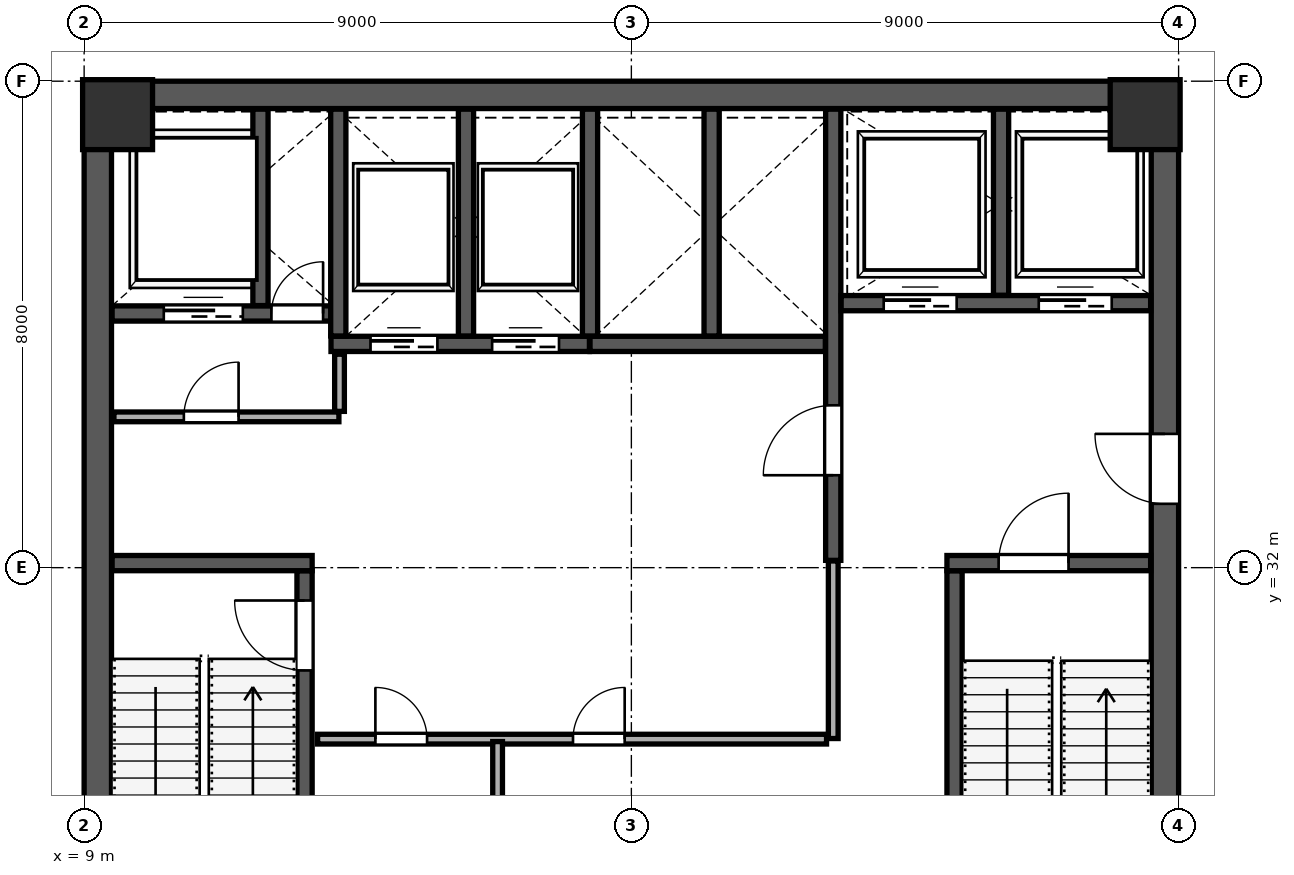
"""IFC4 building model, lengths in metres.
Left out: names, types, materials, properties, quantities, classifications, styles, units other than length and angle.
Written with IfcOpenShell. Run it as: python <this file> out.ifc"""

import sys

from ifc_helpers import new_model, si_unit, direction, frame, frame_2d, origin, origin_2d, place, context, subcontext, project, spatial, rectangle, extrude, source, transform, mapped, element, fill, save


model = new_model("IFC4")
c1 = context("Model", 3, precision=1e-05, world=origin(), true_north=direction((0.0, 1.0)))
c2 = subcontext(c1, "Body", "Model", "MODEL_VIEW")
j1 = project(units=[si_unit("LENGTHUNIT", "METRE"), si_unit("PLANEANGLEUNIT", "RADIAN")], contexts=[c1])
p1 = place(None, origin())
s1 = spatial("IfcSite", under=j1, at=p1, CompositionType="ELEMENT")
p2 = place(p1, origin())
s2 = spatial("IfcBuilding", under=s1, at=p2, CompositionType="ELEMENT")
p3 = place(p2, frame((0.0, 0.0, 179.2)))
s3 = spatial("IfcBuildingStorey", under=s2, at=p3, CompositionType="ELEMENT", Elevation=179.2)
m1 = source(origin(), c2, "Body", "SweptSolid", [
    extrude(rectangle(XDim=1.15, YDim=1.15, at=origin_2d()), origin(), (0.0, 0.0, 1.0), 4.198),
])
for number, where, z_axis, x_axis in (
    (1, (9.55, 39.45, 0.001), (0.0, 0.0, 1.0), (1.0, 0.0, 0.0)),
    (2, (26.45, 39.45, 0.001), (0.0, 0.0, 1.0), (1.0, 0.0, 0.0)),
):
    element("IfcColumn", number, at=place(p3, frame(where, z_axis=z_axis, x_axis=x_axis)), inside=s3, PredefinedType="COLUMN", context=c2, shape_type="MappedRepresentation", body=[
        mapped(m1, transform((0.0, 0.0, 0.0), scale=1.0)),
    ])
p4 = place(p3, frame((9.225, 24.45, 0.0), z_axis=(0.0, 0.0, 1.0), x_axis=(0.0, 1.0, 0.0)))
e3 = element("IfcWall", 3, at=p4, inside=s3, PredefinedType="SHEAR", context=c2, shape_type="SweptSolid", body=[
    extrude(rectangle(XDim=15.1, YDim=0.45, at=frame_2d((7.55, 0.0))), origin(), (0.0, 0.0, 1.0), 3.96),
])
p5 = place(p3, frame((26.775, 24.45, 0.0), z_axis=(0.0, 0.0, 1.0), x_axis=(0.0, 1.0, 0.0)))
e4 = element("IfcWall", 4, at=p5, inside=s3, PredefinedType="SHEAR", context=c2, shape_type="SweptSolid", body=[
    extrude(rectangle(XDim=15.1, YDim=0.45, at=frame_2d((7.55, 0.0))), origin(), (0.0, 0.0, 1.0), 3.96),
])
p6 = place(p5, frame((8.6, 0.0, 0.0)))
e5 = element("IfcOpeningElement", 5, at=p6, cuts=e4, PredefinedType="OPENING", context=c2, shape_type="SweptSolid", body=[
    extrude(rectangle(XDim=1.15, YDim=2.2, at=frame_2d((0.575, 1.1))), frame((0.0, 0.235, 0.0), z_axis=(0.0, -1.0, 0.0), x_axis=(1.0, 0.0, 0.0)), (0.0, 0.0, 1.0), 0.47),
])
p7 = place(p3, frame((9.0, 39.775, 0.0), z_axis=(0.0, 0.0, 1.0), x_axis=(1.0, 0.0, 0.0)))
e6 = element("IfcWall", 6, at=p7, inside=s3, PredefinedType="SHEAR", context=c2, shape_type="SweptSolid", body=[
    extrude(rectangle(XDim=18.0, YDim=0.45, at=frame_2d((9.0, 0.0))), origin(), (0.0, 0.0, 1.0), 3.96),
])
p8 = place(p3, frame((12.625, 24.46, 0.0), z_axis=(0.0, 0.0, 1.0), x_axis=(0.0, 1.0, 0.0)))
e7 = element("IfcWall", 7, at=p8, inside=s3, PredefinedType="SHEAR", context=c2, shape_type="SweptSolid", body=[
    extrude(rectangle(XDim=7.49, YDim=0.25, at=frame_2d((3.745, 0.0))), origin(), (0.0, 0.0, 1.0), 3.96),
])
p9 = place(p8, frame((5.85, 0.0, 0.0)))
e8 = element("IfcOpeningElement", 8, at=p9, cuts=e7, PredefinedType="OPENING", context=c2, shape_type="SweptSolid", body=[
    extrude(rectangle(XDim=1.15, YDim=2.2, at=frame_2d((0.575, 1.1))), frame((0.0, 0.135, 0.0), z_axis=(0.0, -1.0, 0.0), x_axis=(1.0, 0.0, 0.0)), (0.0, 0.0, 1.0), 0.27),
])
p10 = place(p3, frame((9.46, 32.075, 0.0), z_axis=(0.0, 0.0, 1.0), x_axis=(1.0, 0.0, 0.0)))
e9 = element("IfcWall", 9, at=p10, inside=s3, PredefinedType="SHEAR", context=c2, shape_type="SweptSolid", body=[
    extrude(rectangle(XDim=3.29, YDim=0.25, at=frame_2d((1.645, 0.0))), origin(), (0.0, 0.0, 1.0), 3.96),
])
p11 = place(p3, frame((23.315, 24.46, 0.0), z_axis=(0.0, 0.0, 1.0), x_axis=(0.0, 1.0, 0.0)))
e10 = element("IfcWall", 10, at=p11, inside=s3, PredefinedType="SHEAR", context=c2, shape_type="SweptSolid", body=[
    extrude(rectangle(XDim=7.49, YDim=0.25, at=frame_2d((3.745, 0.0))), origin(), (0.0, 0.0, 1.0), 3.96),
])
p12 = place(p3, frame((23.19, 32.075, 0.0), z_axis=(0.0, 0.0, 1.0), x_axis=(1.0, 0.0, 0.0)))
e11 = element("IfcWall", 11, at=p12, inside=s3, PredefinedType="SHEAR", context=c2, shape_type="SweptSolid", body=[
    extrude(rectangle(XDim=3.35, YDim=0.25, at=frame_2d((1.675, 0.0))), origin(), (0.0, 0.0, 1.0), 3.96),
])
p13 = place(p12, frame((0.85, 0.0, 0.0)))
e12 = element("IfcOpeningElement", 12, at=p13, cuts=e11, PredefinedType="OPENING", context=c2, shape_type="SweptSolid", body=[
    extrude(rectangle(XDim=1.15, YDim=2.2, at=frame_2d((0.575, 1.1))), frame((0.0, 0.135, 0.0), z_axis=(0.0, -1.0, 0.0), x_axis=(1.0, 0.0, 0.0)), (0.0, 0.0, 1.0), 0.27),
])
p14 = place(p3, frame((21.32, 32.12, 0.0), z_axis=(0.0, 0.0, 1.0), x_axis=(0.0, 1.0, 0.0)))
e13 = element("IfcWall", 13, at=p14, inside=s3, PredefinedType="SHEAR", context=c2, shape_type="SweptSolid", body=[
    extrude(rectangle(XDim=7.42, YDim=0.25, at=frame_2d((3.71, 0.0))), origin(), (0.0, 0.0, 1.0), 3.96),
])
p15 = place(p14, frame((1.4, 0.0, 0.0)))
e14 = element("IfcOpeningElement", 14, at=p15, cuts=e13, PredefinedType="OPENING", context=c2, shape_type="SweptSolid", body=[
    extrude(rectangle(XDim=1.15, YDim=2.2, at=frame_2d((0.575, 1.1))), frame((0.0, 0.135, 0.0), z_axis=(0.0, -1.0, 0.0), x_axis=(1.0, 0.0, 0.0)), (0.0, 0.0, 1.0), 0.27),
])
p16 = place(p3, frame((9.46, 36.18, 0.0), z_axis=(0.0, 0.0, 1.0), x_axis=(1.0, 0.0, 0.0)))
e15 = element("IfcWall", 15, at=p16, inside=s3, PredefinedType="SHEAR", context=c2, shape_type="SweptSolid", body=[
    extrude(rectangle(XDim=3.79, YDim=0.25, at=frame_2d((1.895, 0.0))), origin(), (0.0, 0.0, 1.0), 3.96),
])
p17 = place(p16, frame((2.62, 0.0, 0.0)))
e16 = element("IfcOpeningElement", 16, at=p17, cuts=e15, PredefinedType="OPENING", context=c2, shape_type="SweptSolid", body=[
    extrude(rectangle(XDim=0.85, YDim=2.1, at=frame_2d((0.425, 1.05))), frame((0.0, 0.135, 0.0), z_axis=(0.0, -1.0, 0.0), x_axis=(1.0, 0.0, 0.0)), (0.0, 0.0, 1.0), 0.27),
])
p18 = place(p16, frame((0.85, 0.0, 0.0)))
e17 = element("IfcOpeningElement", 17, at=p18, cuts=e15, PredefinedType="OPENING", context=c2, shape_type="SweptSolid", body=[
    extrude(rectangle(XDim=1.3, YDim=2.25, at=frame_2d((0.65, 1.125))), frame((0.0, 0.135, 0.0), z_axis=(0.0, -1.0, 0.0), x_axis=(1.0, 0.0, 0.0)), (0.0, 0.0, 1.0), 0.27),
])
p19 = place(p3, frame((11.9, 36.31, 0.0), z_axis=(0.0, 0.0, 1.0), x_axis=(0.0, 1.0, 0.0)))
e18 = element("IfcWall", 18, at=p19, inside=s3, PredefinedType="SHEAR", context=c2, shape_type="SweptSolid", body=[
    extrude(rectangle(XDim=3.23, YDim=0.25, at=frame_2d((1.615, 0.0))), origin(), (0.0, 0.0, 1.0), 3.96),
])
p20 = place(p3, frame((21.45, 36.35, 0.0), z_axis=(0.0, 0.0, 1.0), x_axis=(1.0, 0.0, 0.0)))
e19 = element("IfcWall", 19, at=p20, inside=s3, PredefinedType="SHEAR", context=c2, shape_type="SweptSolid", body=[
    extrude(rectangle(XDim=5.09, YDim=0.25, at=frame_2d((2.545, 0.0))), origin(), (0.0, 0.0, 1.0), 3.96),
])
p21 = place(p20, frame((0.7, 0.0, 0.0)))
e20 = element("IfcOpeningElement", 20, at=p21, cuts=e19, PredefinedType="OPENING", context=c2, shape_type="SweptSolid", body=[
    extrude(rectangle(XDim=1.2, YDim=2.2, at=frame_2d((0.6, 1.1))), frame((0.0, 0.135, 0.0), z_axis=(0.0, -1.0, 0.0), x_axis=(1.0, 0.0, 0.0)), (0.0, 0.0, 1.0), 0.27),
])
p22 = place(p20, frame((3.25, 0.0, 0.0)))
e21 = element("IfcOpeningElement", 21, at=p22, cuts=e19, PredefinedType="OPENING", context=c2, shape_type="SweptSolid", body=[
    extrude(rectangle(XDim=1.2, YDim=2.2, at=frame_2d((0.6, 1.1))), frame((0.0, 0.135, 0.0), z_axis=(0.0, -1.0, 0.0), x_axis=(1.0, 0.0, 0.0)), (0.0, 0.0, 1.0), 0.27),
])
p23 = place(p3, frame((24.08, 36.48, 0.0), z_axis=(0.0, 0.0, 1.0), x_axis=(0.0, 1.0, 0.0)))
e22 = element("IfcWall", 22, at=p23, inside=s3, PredefinedType="SHEAR", context=c2, shape_type="SweptSolid", body=[
    extrude(rectangle(XDim=3.06, YDim=0.25, at=frame_2d((1.53, 0.0))), origin(), (0.0, 0.0, 1.0), 3.96),
])
p24 = place(p3, frame((13.06, 35.68, 0.0), z_axis=(0.0, 0.0, 1.0), x_axis=(1.0, 0.0, 0.0)))
e23 = element("IfcWall", 23, at=p24, inside=s3, PredefinedType="SHEAR", context=c2, shape_type="SweptSolid", body=[
    extrude(rectangle(XDim=4.25, YDim=0.25, at=frame_2d((2.125, 0.0))), origin(), (0.0, 0.0, 1.0), 3.96),
])
p25 = place(p24, frame((0.65, 0.0, 0.0)))
e24 = element("IfcOpeningElement", 24, at=p25, cuts=e23, PredefinedType="OPENING", context=c2, shape_type="SweptSolid", body=[
    extrude(rectangle(XDim=1.1, YDim=2.2, at=frame_2d((0.55, 1.1))), frame((0.0, 0.135, 0.0), z_axis=(0.0, -1.0, 0.0), x_axis=(1.0, 0.0, 0.0)), (0.0, 0.0, 1.0), 0.27),
])
p26 = place(p24, frame((2.65, 0.0, 0.0)))
e25 = element("IfcOpeningElement", 25, at=p26, cuts=e23, PredefinedType="OPENING", context=c2, shape_type="SweptSolid", body=[
    extrude(rectangle(XDim=1.1, YDim=2.2, at=frame_2d((0.55, 1.1))), frame((0.0, 0.135, 0.0), z_axis=(0.0, -1.0, 0.0), x_axis=(1.0, 0.0, 0.0)), (0.0, 0.0, 1.0), 0.27),
])
for number, where, z_axis, x_axis in (
    (26, (13.18, 35.81, 0.0), (0.0, 0.0, 1.0), (0.0, 1.0, 0.0)),
    (27, (15.28, 35.81, 0.0), (0.0, 0.0, 1.0), (0.0, 1.0, 0.0)),
):
    element("IfcWall", number, at=place(p3, frame(where, z_axis=z_axis, x_axis=x_axis)), inside=s3, PredefinedType="SHEAR", context=c2, shape_type="SweptSolid", body=[
        extrude(rectangle(XDim=3.73, YDim=0.25, at=frame_2d((1.865, 0.0))), origin(), (0.0, 0.0, 1.0), 3.96),
    ])
p27 = place(p3, frame((17.32, 35.68, 0.0), z_axis=(0.0, 0.0, 1.0), x_axis=(1.0, 0.0, 0.0)))
e28 = element("IfcWall", 28, at=p27, inside=s3, PredefinedType="SHEAR", context=c2, shape_type="SweptSolid", body=[
    extrude(rectangle(XDim=3.87, YDim=0.25, at=frame_2d((1.935, 0.0))), origin(), (0.0, 0.0, 1.0), 3.96),
])
for number, where, z_axis, x_axis in (
    (29, (17.32, 35.81, 0.0), (0.0, 0.0, 1.0), (0.0, 1.0, 0.0)),
    (30, (19.32, 35.81, 0.0), (0.0, 0.0, 1.0), (0.0, 1.0, 0.0)),
):
    element("IfcWall", number, at=place(p3, frame(where, z_axis=z_axis, x_axis=x_axis)), inside=s3, PredefinedType="SHEAR", context=c2, shape_type="SweptSolid", body=[
        extrude(rectangle(XDim=3.73, YDim=0.25, at=frame_2d((1.865, 0.0))), origin(), (0.0, 0.0, 1.0), 3.96),
    ])
p28 = place(p3, frame((9.49, 34.48, 0.0), z_axis=(0.0, 0.0, 1.0), x_axis=(1.0, 0.0, 0.0)))
e31 = element("IfcWall", 31, at=p28, inside=s3, PredefinedType="PARTITIONING", context=c2, shape_type="SweptSolid", body=[
    extrude(rectangle(XDim=3.7, YDim=0.16, at=frame_2d((1.85, 0.0))), origin(), (0.0, 0.0, 1.0), 3.96),
])
p29 = place(p28, frame((1.15, 0.0, 0.0)))
e32 = element("IfcOpeningElement", 32, at=p29, cuts=e31, PredefinedType="OPENING", context=c2, shape_type="SweptSolid", body=[
    extrude(rectangle(XDim=0.9, YDim=2.15, at=frame_2d((0.45, 1.075))), frame((0.0, 0.09, 0.0), z_axis=(0.0, -1.0, 0.0), x_axis=(1.0, 0.0, 0.0)), (0.0, 0.0, 1.0), 0.18),
])
p30 = place(p3, frame((13.2, 34.57, 0.0), z_axis=(0.0, 0.0, 1.0), x_axis=(0.0, 1.0, 0.0)))
e33 = element("IfcWall", 33, at=p30, inside=s3, PredefinedType="PARTITIONING", context=c2, shape_type="SweptSolid", body=[
    extrude(rectangle(XDim=0.94, YDim=0.16, at=frame_2d((0.47, 0.0))), origin(), (0.0, 0.0, 1.0), 3.96),
])
p31 = place(p3, frame((12.84, 29.18, 0.0), z_axis=(0.0, 0.0, 1.0), x_axis=(1.0, 0.0, 0.0)))
e34 = element("IfcWall", 34, at=p31, inside=s3, PredefinedType="PARTITIONING", context=c2, shape_type="SweptSolid", body=[
    extrude(rectangle(XDim=8.37, YDim=0.16, at=frame_2d((4.185, 0.0))), origin(), (0.0, 0.0, 1.0), 3.96),
])
p32 = place(p31, frame((0.95, 0.0, 0.0)))
e35 = element("IfcOpeningElement", 35, at=p32, cuts=e34, PredefinedType="OPENING", context=c2, shape_type="SweptSolid", body=[
    extrude(rectangle(XDim=0.85, YDim=2.1, at=frame_2d((0.425, 1.05))), frame((0.0, 0.09, 0.0), z_axis=(0.0, -1.0, 0.0), x_axis=(1.0, 0.0, 0.0)), (0.0, 0.0, 1.0), 0.18),
])
p33 = place(p31, frame((4.2, 0.0, 0.0)))
e36 = element("IfcOpeningElement", 36, at=p33, cuts=e34, PredefinedType="OPENING", context=c2, shape_type="SweptSolid", body=[
    extrude(rectangle(XDim=0.85, YDim=2.1, at=frame_2d((0.425, 1.05))), frame((0.0, 0.09, 0.0), z_axis=(0.0, -1.0, 0.0), x_axis=(1.0, 0.0, 0.0)), (0.0, 0.0, 1.0), 0.18),
])
p34 = place(p3, frame((15.8, 24.54, 0.0), z_axis=(0.0, 0.0, 1.0), x_axis=(0.0, 1.0, 0.0)))
e37 = element("IfcWall", 37, at=p34, inside=s3, PredefinedType="PARTITIONING", context=c2, shape_type="SweptSolid", body=[
    extrude(rectangle(XDim=4.6, YDim=0.16, at=frame_2d((2.3, 0.0))), origin(), (0.0, 0.0, 1.0), 3.96),
])
p35 = place(p3, frame((21.32, 29.19, 0.0), z_axis=(0.0, 0.0, 1.0), x_axis=(0.0, 1.0, 0.0)))
e38 = element("IfcWall", 38, at=p35, inside=s3, PredefinedType="PARTITIONING", context=c2, shape_type="SweptSolid", body=[
    extrude(rectangle(XDim=2.92, YDim=0.16, at=frame_2d((1.46, 0.0))), origin(), (0.0, 0.0, 1.0), 3.96),
])
p36 = place(p3, frame((13.23, 49.696, 0.0), z_axis=(0.0, 0.0, 1.0), x_axis=(0.866026251752, -0.499998531275, 0.0)))
e39 = element("IfcWall", 39, at=p36, inside=s3, PredefinedType="PARTITIONING", context=c2, shape_type="SweptSolid", body=[
    extrude(rectangle(XDim=26.69, YDim=0.115, at=frame_2d((13.345, 0.0))), origin(), (0.0, 0.0, 1.0), 3.96),
])
p37 = place(p36, frame((2.1, 0.0, 0.0)))
e40 = element("IfcOpeningElement", 40, at=p37, cuts=e39, PredefinedType="OPENING", context=c2, shape_type="SweptSolid", body=[
    extrude(rectangle(XDim=0.95, YDim=2.15, at=frame_2d((0.475, 1.075))), frame((0.0, 0.067, 0.0), z_axis=(0.0, -1.0, 0.0), x_axis=(1.0, 0.0, 0.0)), (0.0, 0.0, 1.0), 0.135),
])
p38 = place(p36, frame((18.2, 0.0, 0.0)))
e41 = element("IfcOpeningElement", 41, at=p38, cuts=e39, PredefinedType="OPENING", context=c2, shape_type="SweptSolid", body=[
    extrude(rectangle(XDim=0.95, YDim=2.15, at=frame_2d((0.475, 1.075))), frame((0.0, 0.067, 0.0), z_axis=(0.0, -1.0, 0.0), x_axis=(1.0, 0.0, 0.0)), (0.0, 0.0, 1.0), 0.135),
])
p39 = place(p3, frame((1.625, 29.676, 0.0), z_axis=(0.0, 0.0, 1.0), x_axis=(0.500002707681, 0.866023840498, 0.0)))
e42 = element("IfcWall", 42, at=p39, inside=s3, PredefinedType="PARTITIONING", context=c2, shape_type="SweptSolid", body=[
    extrude(rectangle(XDim=23.1, YDim=0.115, at=frame_2d((11.55, 0.0))), origin(), (0.0, 0.0, 1.0), 3.96),
])
p40 = place(p39, frame((1.3, 0.0, 0.0)))
e43 = element("IfcOpeningElement", 43, at=p40, cuts=e42, PredefinedType="OPENING", context=c2, shape_type="SweptSolid", body=[
    extrude(rectangle(XDim=0.95, YDim=2.15, at=frame_2d((0.475, 1.075))), frame((0.0, 0.067, 0.0), z_axis=(0.0, -1.0, 0.0), x_axis=(1.0, 0.0, 0.0)), (0.0, 0.0, 1.0), 0.135),
])
p41 = place(p39, frame((13.8, 0.0, 0.0)))
e44 = element("IfcOpeningElement", 44, at=p41, cuts=e42, PredefinedType="OPENING", context=c2, shape_type="SweptSolid", body=[
    extrude(rectangle(XDim=0.95, YDim=2.15, at=frame_2d((0.475, 1.075))), frame((0.0, 0.067, 0.0), z_axis=(0.0, -1.0, 0.0), x_axis=(1.0, 0.0, 0.0)), (0.0, 0.0, 1.0), 0.135),
])
p42 = place(p3, frame((21.774, 11.034, 0.0), z_axis=(0.0, 0.0, 1.0), x_axis=(0.500008037328, 0.866020763381, 0.0)))
e45 = element("IfcWall", 45, at=p42, inside=s3, PredefinedType="PARTITIONING", context=c2, shape_type="SweptSolid", body=[
    extrude(rectangle(XDim=19.98, YDim=0.16, at=frame_2d((9.99, 0.0))), origin(), (0.0, 0.0, 1.0), 3.96),
])
m2 = source(origin(), c2, "Body", "SweptSolid", [
    extrude(rectangle(XDim=1.15, YDim=2.2, at=frame_2d((0.575, 1.1))), frame((0.0, 0.025, 0.0), z_axis=(0.0, -1.0, 0.0), x_axis=(1.0, 0.0, 0.0)), (0.0, 0.0, 1.0), 0.05),
])
p43 = place(p9, origin())
e46 = element("IfcDoor", 46, at=p43, inside=s3, OperationType="SINGLE_SWING_RIGHT", PredefinedType="DOOR", context=c2, shape_type="MappedRepresentation", body=[
    mapped(m2, transform((0.0, 0.0, 0.0), scale=1.0)),
])
fill(e8, e46)
m3 = source(origin(), c2, "Body", "SweptSolid", [
    extrude(rectangle(XDim=1.15, YDim=2.2, at=frame_2d((0.575, 1.1))), frame((0.0, 0.025, 0.0), z_axis=(0.0, -1.0, 0.0), x_axis=(1.0, 0.0, 0.0)), (0.0, 0.0, 1.0), 0.05),
])
p44 = place(p15, origin())
e47 = element("IfcDoor", 47, at=p44, inside=s3, OperationType="SINGLE_SWING_LEFT", PredefinedType="DOOR", context=c2, shape_type="MappedRepresentation", body=[
    mapped(m3, transform((0.0, 0.0, 0.0), scale=1.0)),
])
fill(e14, e47)
p45 = place(p13, origin())
e48 = element("IfcDoor", 48, at=p45, inside=s3, OperationType="SINGLE_SWING_RIGHT", PredefinedType="DOOR", context=c2, shape_type="MappedRepresentation", body=[
    mapped(m2, transform((0.0, 0.0, 0.0), scale=1.0)),
])
fill(e12, e48)
p46 = place(p6, origin())
e49 = element("IfcDoor", 49, at=p46, inside=s3, OperationType="SINGLE_SWING_RIGHT", PredefinedType="DOOR", context=c2, shape_type="MappedRepresentation", body=[
    mapped(m3, transform((0.0, 0.0, 0.0), scale=1.0)),
])
fill(e5, e49)
m4 = source(origin(), c2, "Body", "SweptSolid", [
    extrude(rectangle(XDim=0.85, YDim=2.1, at=frame_2d((0.425, 1.05))), frame((0.0, 0.025, 0.0), z_axis=(0.0, -1.0, 0.0), x_axis=(1.0, 0.0, 0.0)), (0.0, 0.0, 1.0), 0.05),
])
p47 = place(p17, origin())
e50 = element("IfcDoor", 50, at=p47, inside=s3, OperationType="SINGLE_SWING_RIGHT", PredefinedType="DOOR", context=c2, shape_type="MappedRepresentation", body=[
    mapped(m4, transform((0.0, 0.0, 0.0), scale=1.0)),
])
fill(e16, e50)
m5 = source(origin(), c2, "Body", "SweptSolid", [
    extrude(rectangle(XDim=1.1, YDim=2.2, at=frame_2d((0.55, 1.1))), frame((0.0, 0.025, 0.0), z_axis=(0.0, -1.0, 0.0), x_axis=(1.0, 0.0, 0.0)), (0.0, 0.0, 1.0), 0.05),
])
p48 = place(p25, origin())
e51 = element("IfcDoor", 51, at=p48, inside=s3, OperationType="SLIDING_TO_LEFT", PredefinedType="DOOR", context=c2, shape_type="MappedRepresentation", body=[
    mapped(m5, transform((0.0, 0.0, 0.0), scale=1.0)),
])
fill(e24, e51)
p49 = place(p26, origin())
e52 = element("IfcDoor", 52, at=p49, inside=s3, OperationType="SLIDING_TO_RIGHT", PredefinedType="DOOR", context=c2, shape_type="MappedRepresentation", body=[
    mapped(m5, transform((0.0, 0.0, 0.0), scale=1.0)),
])
fill(e25, e52)
m6 = source(origin(), c2, "Body", "SweptSolid", [
    extrude(rectangle(XDim=1.2, YDim=2.2, at=frame_2d((0.6, 1.1))), frame((0.0, 0.025, 0.0), z_axis=(0.0, -1.0, 0.0), x_axis=(1.0, 0.0, 0.0)), (0.0, 0.0, 1.0), 0.05),
])
p50 = place(p21, origin())
e53 = element("IfcDoor", 53, at=p50, inside=s3, OperationType="SLIDING_TO_LEFT", PredefinedType="DOOR", context=c2, shape_type="MappedRepresentation", body=[
    mapped(m6, transform((0.0, 0.0, 0.0), scale=1.0)),
])
fill(e20, e53)
p51 = place(p22, origin())
e54 = element("IfcDoor", 54, at=p51, inside=s3, OperationType="SLIDING_TO_RIGHT", PredefinedType="DOOR", context=c2, shape_type="MappedRepresentation", body=[
    mapped(m6, transform((0.0, 0.0, 0.0), scale=1.0)),
])
fill(e21, e54)
m7 = source(origin(), c2, "Body", "SweptSolid", [
    extrude(rectangle(XDim=1.3, YDim=2.25, at=frame_2d((0.65, 1.125))), frame((0.0, 0.025, 0.0), z_axis=(0.0, -1.0, 0.0), x_axis=(1.0, 0.0, 0.0)), (0.0, 0.0, 1.0), 0.05),
])
p52 = place(p18, origin())
e55 = element("IfcDoor", 55, at=p52, inside=s3, OperationType="SLIDING_TO_LEFT", PredefinedType="DOOR", context=c2, shape_type="MappedRepresentation", body=[
    mapped(m7, transform((0.0, 0.0, 0.0), scale=1.0)),
])
fill(e17, e55)
m8 = source(origin(), c2, "Body", "SweptSolid", [
    extrude(rectangle(XDim=0.9, YDim=2.15, at=frame_2d((0.45, 1.075))), frame((0.0, 0.025, 0.0), z_axis=(0.0, -1.0, 0.0), x_axis=(1.0, 0.0, 0.0)), (0.0, 0.0, 1.0), 0.05),
])
p53 = place(p29, origin())
e56 = element("IfcDoor", 56, at=p53, inside=s3, OperationType="SINGLE_SWING_RIGHT", PredefinedType="DOOR", context=c2, shape_type="MappedRepresentation", body=[
    mapped(m8, transform((0.0, 0.0, 0.0), scale=1.0)),
])
fill(e32, e56)
p54 = place(p32, origin())
e57 = element("IfcDoor", 57, at=p54, inside=s3, OperationType="SINGLE_SWING_LEFT", PredefinedType="DOOR", context=c2, shape_type="MappedRepresentation", body=[
    mapped(m4, transform((0.0, 0.0, 0.0), scale=1.0)),
])
fill(e35, e57)
p55 = place(p33, origin())
e58 = element("IfcDoor", 58, at=p55, inside=s3, OperationType="SINGLE_SWING_RIGHT", PredefinedType="DOOR", context=c2, shape_type="MappedRepresentation", body=[
    mapped(m4, transform((0.0, 0.0, 0.0), scale=1.0)),
])
fill(e36, e58)
save(model, sys.argv[1])
